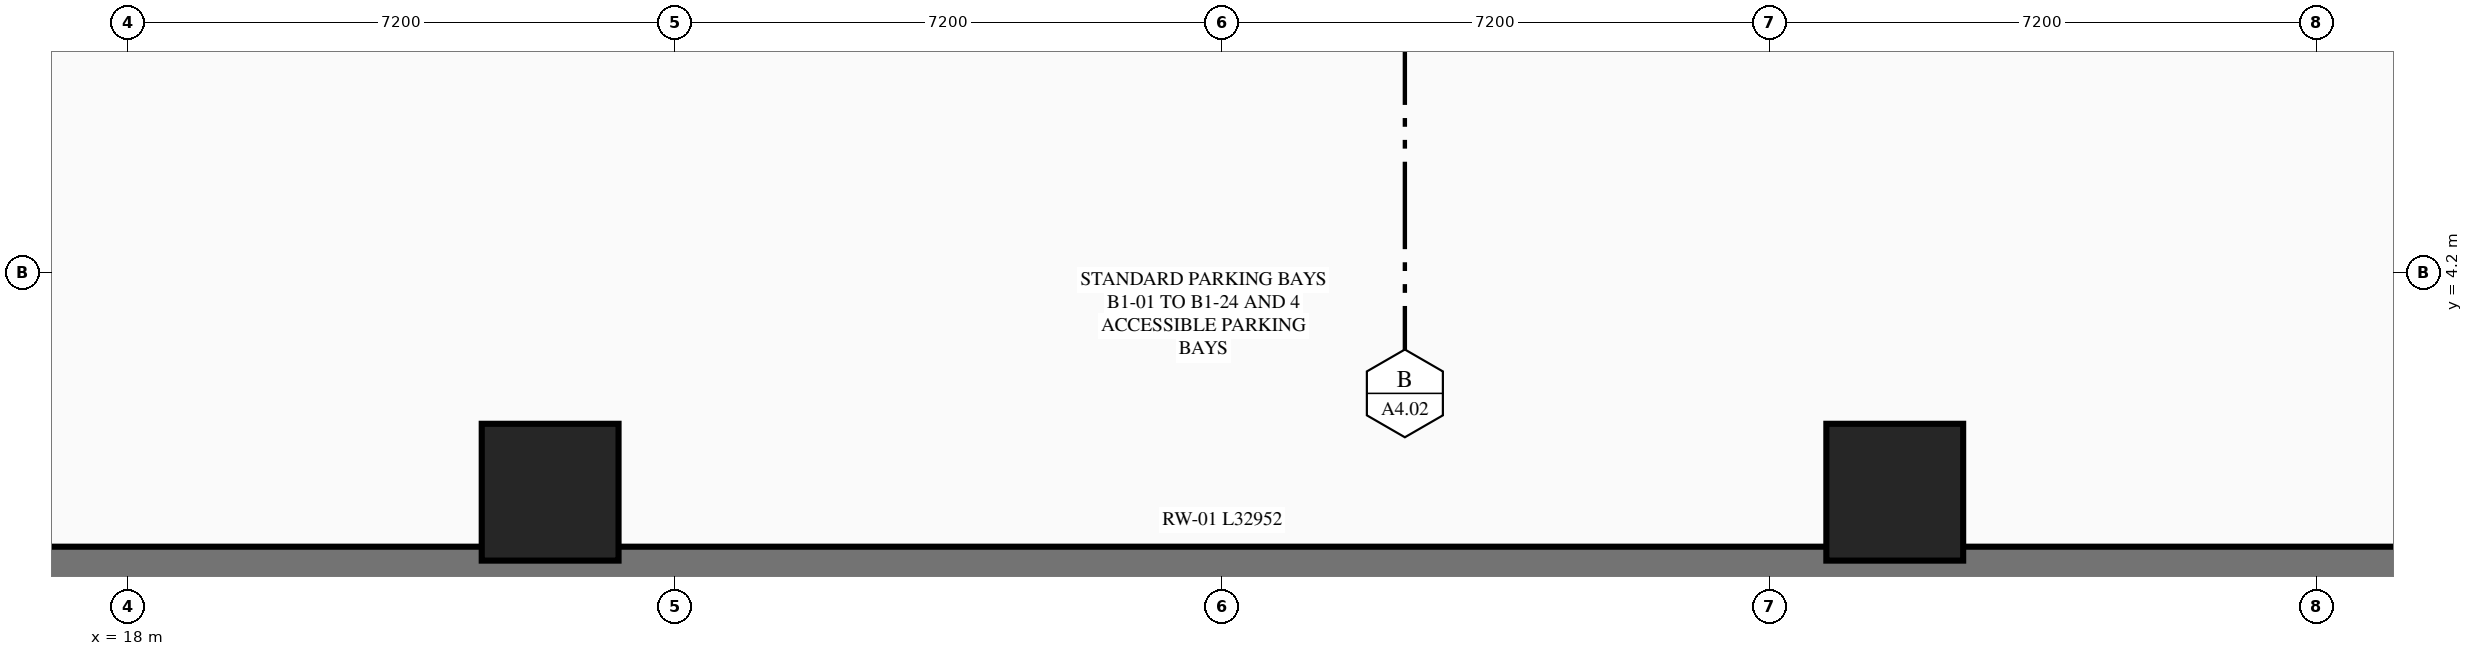
"""IFC4 building model, lengths in metres.
Left out: names, types, materials, properties, quantities, classifications, styles, units other than length and angle.
Written with IfcOpenShell. Run it as: python <this file> out.ifc"""

import sys

from ifc_helpers import new_model, si_unit, direction, frame, frame_2d, origin, origin_2d, place, context, subcontext, project, spatial, rectangle, extrude, element, save


model = new_model("IFC4")
c1 = context("Model", 3, precision=1e-05, world=origin(), true_north=direction((0.0, 1.0)))
c2 = subcontext(c1, "Body", "Model", "MODEL_VIEW")
j1 = project(units=[si_unit("LENGTHUNIT", "METRE"), si_unit("PLANEANGLEUNIT", "RADIAN")], contexts=[c1])
p1 = place(None, origin())
s1 = spatial("IfcSite", under=j1, at=p1, CompositionType="ELEMENT")
p2 = place(p1, origin())
s2 = spatial("IfcBuilding", under=s1, at=p2, CompositionType="ELEMENT")
p3 = place(p2, frame((0.0, 0.0, -4.8)))
s3 = spatial("IfcBuildingStorey", under=s2, at=p3, CompositionType="ELEMENT", Elevation=-4.8)
p4 = place(p3, frame((15.924, 0.3, 0.0), z_axis=(0.0, 0.0, 1.0), x_axis=(1.0, 0.0, 0.0)))
e1 = element("IfcWall", 1, at=p4, inside=s3, PredefinedType="USERDEFINED", context=c2, shape_type="SweptSolid", body=[
    extrude(rectangle(XDim=32.952, YDim=0.6, at=frame_2d((16.476, 0.0))), origin(), (0.0, 0.0, 1.0), 4.55),
])
for number, where, z_axis, x_axis in (
    (2, (23.555, 1.317, 0.0), (0.0, 0.0, 1.0), (1.0, 0.0, 0.0)),
    (3, (41.245, 1.317, 0.0), (0.0, 0.0, 1.0), (1.0, 0.0, 0.0)),
):
    element("IfcColumn", number, at=place(p3, frame(where, z_axis=z_axis, x_axis=x_axis)), inside=s3, PredefinedType="COLUMN", context=c2, shape_type="SweptSolid", body=[
        extrude(rectangle(XDim=1.8, YDim=1.8, at=origin_2d()), origin(), (0.0, 0.0, 1.0), 4.8),
    ])
save(model, sys.argv[1])
